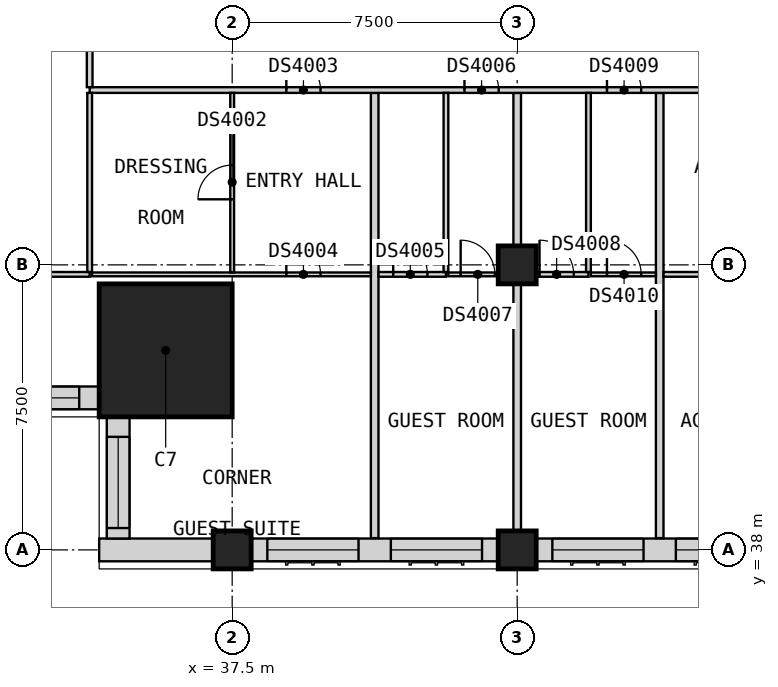
"""IFC4 building model, lengths in metres.
Left out: names, types, materials, properties, quantities, classifications, styles, units other than length and angle.
Written with IfcOpenShell. Run it as: python <this file> out.ifc"""

import sys

from ifc_helpers import new_model, si_unit, direction, frame, frame_2d, origin, origin_2d, place, context, subcontext, project, spatial, rectangle, extrude, element, fill, save


model = new_model("IFC4")
c1 = context("Model", 3, precision=1e-05, world=origin(), true_north=direction((0.0, 1.0)))
c2 = subcontext(c1, "Body", "Model", "MODEL_VIEW")
j1 = project(units=[si_unit("LENGTHUNIT", "METRE"), si_unit("PLANEANGLEUNIT", "RADIAN")], contexts=[c1])
p1 = place(None, origin())
s1 = spatial("IfcSite", under=j1, at=p1, CompositionType="ELEMENT")
p2 = place(p1, origin())
s2 = spatial("IfcBuilding", under=s1, at=p2, CompositionType="ELEMENT")
p3 = place(p2, frame((0.0, 0.0, 141.0)))
s3 = spatial("IfcBuildingStorey", under=s2, at=p3, CompositionType="ELEMENT", Elevation=141.0)
for number, where, z_axis, x_axis in (
    (1, (37.5, 38.0, 0.0), (0.0, 0.0, 1.0), (1.0, 0.0, 0.0)),
    (2, (45.0, 38.0, 0.0), (0.0, 0.0, 1.0), (1.0, 0.0, 0.0)),
    (3, (45.0, 45.5, 0.0), (0.0, 0.0, 1.0), (1.0, 0.0, 0.0)),
):
    element("IfcColumn", number, at=place(p3, frame(where, z_axis=z_axis, x_axis=x_axis)), inside=s3, PredefinedType="COLUMN", context=c2, shape_type="SweptSolid", body=[
        extrude(rectangle(XDim=1.0, YDim=1.0, at=origin_2d()), origin(), (0.0, 0.0, 1.0), 3.6),
    ])
p4 = place(p3, frame((35.75, 43.25, 0.0), z_axis=(0.0, 0.0, 1.0), x_axis=(1.0, 0.0, 0.0)))
e4 = element("IfcColumn", 4, at=p4, inside=s3, PredefinedType="COLUMN", context=c2, shape_type="SweptSolid", body=[
    extrude(rectangle(XDim=3.5, YDim=3.5, at=origin_2d()), origin(), (0.0, 0.0, 1.0), 3.6),
])
p5 = place(p3, frame((34.0, 38.0, 0.0), z_axis=(0.0, 0.0, 1.0), x_axis=(1.0, 0.0, 0.0)))
e5 = element("IfcWall", 5, at=p5, inside=s3, PredefinedType="SOLIDWALL", context=c2, shape_type="SweptSolid", body=[
    extrude(rectangle(XDim=3.0, YDim=0.6, at=frame_2d((1.5, 0.0))), origin(), (0.0, 0.0, 1.0), 3.35),
])
p6 = place(p3, frame((38.0, 38.0, 0.0), z_axis=(0.0, 0.0, 1.0), x_axis=(1.0, 0.0, 0.0)))
e6 = element("IfcWall", 6, at=p6, inside=s3, PredefinedType="SOLIDWALL", context=c2, shape_type="SweptSolid", body=[
    extrude(rectangle(XDim=6.5, YDim=0.6, at=frame_2d((3.25, 0.0))), origin(), (0.0, 0.0, 1.0), 2.85),
])
p7 = place(p6, frame((0.425, 0.0, 0.8)))
e7 = element("IfcOpeningElement", 7, at=p7, cuts=e6, PredefinedType="OPENING", context=c2, shape_type="SweptSolid", body=[
    extrude(rectangle(XDim=2.4, YDim=1.8, at=frame_2d((1.2, 0.9))), frame((0.0, 0.31, 0.0), z_axis=(0.0, -1.0, 0.0), x_axis=(1.0, 0.0, 0.0)), (0.0, 0.0, 1.0), 0.62),
])
p8 = place(p6, frame((3.675, 0.0, 0.8)))
e8 = element("IfcOpeningElement", 8, at=p8, cuts=e6, PredefinedType="OPENING", context=c2, shape_type="SweptSolid", body=[
    extrude(rectangle(XDim=2.4, YDim=1.8, at=frame_2d((1.2, 0.9))), frame((0.0, 0.31, 0.0), z_axis=(0.0, -1.0, 0.0), x_axis=(1.0, 0.0, 0.0)), (0.0, 0.0, 1.0), 0.62),
])
p9 = place(p3, frame((45.5, 38.0, 0.0), z_axis=(0.0, 0.0, 1.0), x_axis=(1.0, 0.0, 0.0)))
e9 = element("IfcWall", 9, at=p9, inside=s3, PredefinedType="SOLIDWALL", context=c2, shape_type="SweptSolid", body=[
    extrude(rectangle(XDim=6.5, YDim=0.6, at=frame_2d((3.25, 0.0))), origin(), (0.0, 0.0, 1.0), 2.85),
])
p10 = place(p9, frame((0.425, 0.0, 0.8)))
e10 = element("IfcOpeningElement", 10, at=p10, cuts=e9, PredefinedType="OPENING", context=c2, shape_type="SweptSolid", body=[
    extrude(rectangle(XDim=2.4, YDim=1.8, at=frame_2d((1.2, 0.9))), frame((0.0, 0.31, 0.0), z_axis=(0.0, -1.0, 0.0), x_axis=(1.0, 0.0, 0.0)), (0.0, 0.0, 1.0), 0.62),
])
p11 = place(p9, frame((3.675, 0.0, 0.8)))
e11 = element("IfcOpeningElement", 11, at=p11, cuts=e9, PredefinedType="OPENING", context=c2, shape_type="SweptSolid", body=[
    extrude(rectangle(XDim=2.4, YDim=1.8, at=frame_2d((1.2, 0.9))), frame((0.0, 0.31, 0.0), z_axis=(0.0, -1.0, 0.0), x_axis=(1.0, 0.0, 0.0)), (0.0, 0.0, 1.0), 0.62),
])
p12 = place(p3, frame((30.8, 42.0, 0.0), z_axis=(0.0, 0.0, 1.0), x_axis=(1.0, 0.0, 0.0)))
e12 = element("IfcWall", 12, at=p12, inside=s3, PredefinedType="SOLIDWALL", context=c2, shape_type="SweptSolid", body=[
    extrude(rectangle(XDim=3.2, YDim=0.6, at=frame_2d((1.6, 0.0))), origin(), (0.0, 0.0, 1.0), 3.35),
])
p13 = place(p12, frame((0.275, 0.0, 0.8)))
e13 = element("IfcOpeningElement", 13, at=p13, cuts=e12, PredefinedType="OPENING", context=c2, shape_type="SweptSolid", body=[
    extrude(rectangle(XDim=2.4, YDim=1.8, at=frame_2d((1.2, 0.9))), frame((0.0, 0.31, 0.0), z_axis=(0.0, -1.0, 0.0), x_axis=(1.0, 0.0, 0.0)), (0.0, 0.0, 1.0), 0.62),
])
p14 = place(p3, frame((34.5, 41.5, 0.0), z_axis=(0.0, 0.0, 1.0), x_axis=(0.0, -1.0, 0.0)))
e14 = element("IfcWall", 14, at=p14, inside=s3, PredefinedType="SOLIDWALL", context=c2, shape_type="SweptSolid", body=[
    extrude(rectangle(XDim=3.2, YDim=0.6, at=frame_2d((1.6, 0.0))), origin(), (0.0, 0.0, 1.0), 3.35),
])
p15 = place(p14, frame((0.525, 0.0, 0.8)))
e15 = element("IfcOpeningElement", 15, at=p15, cuts=e14, PredefinedType="OPENING", context=c2, shape_type="SweptSolid", body=[
    extrude(rectangle(XDim=2.4, YDim=1.8, at=frame_2d((1.2, 0.9))), frame((0.0, 0.31, 0.0), z_axis=(0.0, -1.0, 0.0), x_axis=(1.0, 0.0, 0.0)), (0.0, 0.0, 1.0), 0.62),
])
p16 = place(p3, frame((41.25, 38.31, 0.0), z_axis=(0.0, 0.0, 1.0), x_axis=(0.0, 1.0, 0.0)))
e16 = element("IfcWall", 16, at=p16, inside=s3, PredefinedType="PARTITIONING", context=c2, shape_type="SweptSolid", body=[
    extrude(rectangle(XDim=11.715, YDim=0.2, at=frame_2d((5.857, 0.0))), origin(), (0.0, 0.0, 1.0), 3.35),
])
p17 = place(p3, frame((45.0, 37.5, 0.0), z_axis=(0.0, 0.0, 1.0), x_axis=(0.0, 1.0, 0.0)))
e17 = element("IfcWall", 17, at=p17, inside=s3, PredefinedType="PARTITIONING", context=c2, shape_type="SweptSolid", body=[
    extrude(rectangle(XDim=12.525, YDim=0.2, at=frame_2d((6.262, 0.0))), origin(), (0.0, 0.0, 1.0), 3.35),
])
p18 = place(p3, frame((48.75, 38.31, 0.0), z_axis=(0.0, 0.0, 1.0), x_axis=(0.0, 1.0, 0.0)))
e18 = element("IfcWall", 18, at=p18, inside=s3, PredefinedType="PARTITIONING", context=c2, shape_type="SweptSolid", body=[
    extrude(rectangle(XDim=11.715, YDim=0.2, at=frame_2d((5.857, 0.0))), origin(), (0.0, 0.0, 1.0), 3.35),
])
p19 = place(p3, frame((33.75, 50.1, 0.0), z_axis=(0.0, 0.0, 1.0), x_axis=(1.0, 0.0, 0.0)))
e19 = element("IfcWall", 19, at=p19, inside=s3, PredefinedType="PARTITIONING", context=c2, shape_type="SweptSolid", body=[
    extrude(rectangle(XDim=39.9, YDim=0.15, at=frame_2d((19.95, 0.0))), origin(), (0.0, 0.0, 1.0), 3.35),
])
p20 = place(p19, frame((5.175, 0.0, 0.0)))
e20 = element("IfcOpeningElement", 20, at=p20, cuts=e19, PredefinedType="OPENING", context=c2, shape_type="SweptSolid", body=[
    extrude(rectangle(XDim=0.9, YDim=2.1, at=frame_2d((0.45, 1.05))), frame((0.0, 0.085, 0.0), z_axis=(0.0, -1.0, 0.0), x_axis=(1.0, 0.0, 0.0)), (0.0, 0.0, 1.0), 0.17),
])
p21 = place(p19, frame((9.863, 0.0, 0.0)))
e21 = element("IfcOpeningElement", 21, at=p21, cuts=e19, PredefinedType="OPENING", context=c2, shape_type="SweptSolid", body=[
    extrude(rectangle(XDim=0.9, YDim=2.1, at=frame_2d((0.45, 1.05))), frame((0.0, 0.085, 0.0), z_axis=(0.0, -1.0, 0.0), x_axis=(1.0, 0.0, 0.0)), (0.0, 0.0, 1.0), 0.17),
])
p22 = place(p19, frame((13.613, 0.0, 0.0)))
e22 = element("IfcOpeningElement", 22, at=p22, cuts=e19, PredefinedType="OPENING", context=c2, shape_type="SweptSolid", body=[
    extrude(rectangle(XDim=0.9, YDim=2.1, at=frame_2d((0.45, 1.05))), frame((0.0, 0.085, 0.0), z_axis=(0.0, -1.0, 0.0), x_axis=(1.0, 0.0, 0.0)), (0.0, 0.0, 1.0), 0.17),
])
p23 = place(p19, frame((20.688, 0.0, 0.0)))
e23 = element("IfcOpeningElement", 23, at=p23, cuts=e19, PredefinedType="OPENING", context=c2, shape_type="SweptSolid", body=[
    extrude(rectangle(XDim=1.0, YDim=2.1, at=frame_2d((0.5, 1.05))), frame((0.0, 0.085, 0.0), z_axis=(0.0, -1.0, 0.0), x_axis=(1.0, 0.0, 0.0)), (0.0, 0.0, 1.0), 0.17),
])
p24 = place(p19, frame((28.188, 0.0, 0.0)))
e24 = element("IfcOpeningElement", 24, at=p24, cuts=e19, PredefinedType="OPENING", context=c2, shape_type="SweptSolid", body=[
    extrude(rectangle(XDim=1.0, YDim=2.1, at=frame_2d((0.5, 1.05))), frame((0.0, 0.085, 0.0), z_axis=(0.0, -1.0, 0.0), x_axis=(1.0, 0.0, 0.0)), (0.0, 0.0, 1.0), 0.17),
])
p25 = place(p19, frame((32.363, 0.0, 0.0)))
e25 = element("IfcOpeningElement", 25, at=p25, cuts=e19, PredefinedType="OPENING", context=c2, shape_type="SweptSolid", body=[
    extrude(rectangle(XDim=0.9, YDim=2.1, at=frame_2d((0.45, 1.05))), frame((0.0, 0.085, 0.0), z_axis=(0.0, -1.0, 0.0), x_axis=(1.0, 0.0, 0.0)), (0.0, 0.0, 1.0), 0.17),
])
p26 = place(p19, frame((36.113, 0.0, 0.0)))
e26 = element("IfcOpeningElement", 26, at=p26, cuts=e19, PredefinedType="OPENING", context=c2, shape_type="SweptSolid", body=[
    extrude(rectangle(XDim=0.9, YDim=2.1, at=frame_2d((0.45, 1.05))), frame((0.0, 0.085, 0.0), z_axis=(0.0, -1.0, 0.0), x_axis=(1.0, 0.0, 0.0)), (0.0, 0.0, 1.0), 0.17),
])
p27 = place(p19, frame((38.25, 0.0, 0.0)))
e27 = element("IfcOpeningElement", 27, at=p27, cuts=e19, PredefinedType="OPENING", context=c2, shape_type="SweptSolid", body=[
    extrude(rectangle(XDim=0.9, YDim=2.1, at=frame_2d((0.45, 1.05))), frame((0.0, 0.085, 0.0), z_axis=(0.0, -1.0, 0.0), x_axis=(1.0, 0.0, 0.0)), (0.0, 0.0, 1.0), 0.17),
])
p28 = place(p3, frame((33.75, 50.175, 0.0), z_axis=(0.0, 0.0, 1.0), x_axis=(0.0, 1.0, 0.0)))
e28 = element("IfcWall", 28, at=p28, inside=s3, PredefinedType="PARTITIONING", context=c2, shape_type="SweptSolid", body=[
    extrude(rectangle(XDim=2.225, YDim=0.15, at=frame_2d((1.112, 0.0))), origin(), (0.0, 0.0, 1.0), 3.35),
])
p29 = place(p3, frame((33.812, 45.25, 0.0), z_axis=(0.0, 0.0, 1.0), x_axis=(1.0, 0.0, 0.0)))
e29 = element("IfcWall", 29, at=p29, inside=s3, PredefinedType="PARTITIONING", context=c2, shape_type="SweptSolid", body=[
    extrude(rectangle(XDim=7.337, YDim=0.1, at=frame_2d((3.669, 0.0))), origin(), (0.0, 0.0, 1.0), 3.35),
])
p30 = place(p29, frame((5.113, 0.0, 0.0)))
e30 = element("IfcOpeningElement", 30, at=p30, cuts=e29, PredefinedType="OPENING", context=c2, shape_type="SweptSolid", body=[
    extrude(rectangle(XDim=0.9, YDim=2.1, at=frame_2d((0.45, 1.05))), frame((0.0, 0.06, 0.0), z_axis=(0.0, -1.0, 0.0), x_axis=(1.0, 0.0, 0.0)), (0.0, 0.0, 1.0), 0.12),
])
p31 = place(p3, frame((43.188, 45.25, 0.0), z_axis=(0.0, 0.0, 1.0), x_axis=(1.0, 0.0, 0.0)))
e31 = element("IfcWall", 31, at=p31, inside=s3, PredefinedType="PARTITIONING", context=c2, shape_type="SweptSolid", body=[
    extrude(rectangle(XDim=1.712, YDim=0.1, at=frame_2d((0.856, 0.0))), origin(), (0.0, 0.0, 1.0), 3.35),
])
p32 = place(p31, frame((0.325, 0.0, 0.0)))
e32 = element("IfcOpeningElement", 32, at=p32, cuts=e31, PredefinedType="OPENING", context=c2, shape_type="SweptSolid", body=[
    extrude(rectangle(XDim=0.9, YDim=2.1, at=frame_2d((0.45, 1.05))), frame((0.0, 0.06, 0.0), z_axis=(0.0, -1.0, 0.0), x_axis=(1.0, 0.0, 0.0)), (0.0, 0.0, 1.0), 0.12),
])
p33 = place(p3, frame((46.938, 45.25, 0.0), z_axis=(0.0, 0.0, 1.0), x_axis=(1.0, 0.0, 0.0)))
e33 = element("IfcWall", 33, at=p33, inside=s3, PredefinedType="PARTITIONING", context=c2, shape_type="SweptSolid", body=[
    extrude(rectangle(XDim=1.712, YDim=0.1, at=frame_2d((0.856, 0.0))), origin(), (0.0, 0.0, 1.0), 3.35),
])
p34 = place(p33, frame((0.425, 0.0, 0.0)))
e34 = element("IfcOpeningElement", 34, at=p34, cuts=e33, PredefinedType="OPENING", context=c2, shape_type="SweptSolid", body=[
    extrude(rectangle(XDim=0.9, YDim=2.1, at=frame_2d((0.45, 1.05))), frame((0.0, 0.06, 0.0), z_axis=(0.0, -1.0, 0.0), x_axis=(1.0, 0.0, 0.0)), (0.0, 0.0, 1.0), 0.12),
])
p35 = place(p3, frame((37.5, 45.3, 0.0), z_axis=(0.0, 0.0, 1.0), x_axis=(0.0, 1.0, 0.0)))
e35 = element("IfcWall", 35, at=p35, inside=s3, PredefinedType="PARTITIONING", context=c2, shape_type="SweptSolid", body=[
    extrude(rectangle(XDim=4.725, YDim=0.1, at=frame_2d((2.362, 0.0))), origin(), (0.0, 0.0, 1.0), 3.35),
])
p36 = place(p35, frame((1.925, 0.0, 0.0)))
e36 = element("IfcOpeningElement", 36, at=p36, cuts=e35, PredefinedType="OPENING", context=c2, shape_type="SweptSolid", body=[
    extrude(rectangle(XDim=0.9, YDim=2.1, at=frame_2d((0.45, 1.05))), frame((0.0, 0.06, 0.0), z_axis=(0.0, -1.0, 0.0), x_axis=(1.0, 0.0, 0.0)), (0.0, 0.0, 1.0), 0.12),
])
p37 = place(p3, frame((30.0, 45.25, 0.0), z_axis=(0.0, 0.0, 1.0), x_axis=(1.0, 0.0, 0.0)))
e37 = element("IfcWall", 37, at=p37, inside=s3, PredefinedType="PARTITIONING", context=c2, shape_type="SweptSolid", body=[
    extrude(rectangle(XDim=3.75, YDim=0.125, at=frame_2d((1.875, 0.0))), origin(), (0.0, 0.0, 1.0), 3.35),
])
p38 = place(p37, frame((1.425, 0.0, 0.0)))
e38 = element("IfcOpeningElement", 38, at=p38, cuts=e37, PredefinedType="OPENING", context=c2, shape_type="SweptSolid", body=[
    extrude(rectangle(XDim=0.9, YDim=2.1, at=frame_2d((0.45, 1.05))), frame((0.0, 0.073, 0.0), z_axis=(0.0, -1.0, 0.0), x_axis=(1.0, 0.0, 0.0)), (0.0, 0.0, 1.0), 0.145),
])
p39 = place(p3, frame((41.35, 45.25, 0.0), z_axis=(0.0, 0.0, 1.0), x_axis=(1.0, 0.0, 0.0)))
e39 = element("IfcWall", 39, at=p39, inside=s3, PredefinedType="PARTITIONING", context=c2, shape_type="SweptSolid", body=[
    extrude(rectangle(XDim=1.775, YDim=0.125, at=frame_2d((0.887, 0.0))), origin(), (0.0, 0.0, 1.0), 3.35),
])
p40 = place(p39, frame((0.387, 0.0, 0.0)))
e40 = element("IfcOpeningElement", 40, at=p40, cuts=e39, PredefinedType="OPENING", context=c2, shape_type="SweptSolid", body=[
    extrude(rectangle(XDim=0.9, YDim=2.1, at=frame_2d((0.45, 1.05))), frame((0.0, 0.073, 0.0), z_axis=(0.0, -1.0, 0.0), x_axis=(1.0, 0.0, 0.0)), (0.0, 0.0, 1.0), 0.145),
])
p41 = place(p3, frame((45.1, 45.25, 0.0), z_axis=(0.0, 0.0, 1.0), x_axis=(1.0, 0.0, 0.0)))
e41 = element("IfcWall", 41, at=p41, inside=s3, PredefinedType="PARTITIONING", context=c2, shape_type="SweptSolid", body=[
    extrude(rectangle(XDim=1.775, YDim=0.125, at=frame_2d((0.887, 0.0))), origin(), (0.0, 0.0, 1.0), 3.35),
])
p42 = place(p41, frame((0.488, 0.0, 0.0)))
e42 = element("IfcOpeningElement", 42, at=p42, cuts=e41, PredefinedType="OPENING", context=c2, shape_type="SweptSolid", body=[
    extrude(rectangle(XDim=0.9, YDim=2.1, at=frame_2d((0.45, 1.05))), frame((0.0, 0.073, 0.0), z_axis=(0.0, -1.0, 0.0), x_axis=(1.0, 0.0, 0.0)), (0.0, 0.0, 1.0), 0.145),
])
p43 = place(p3, frame((48.85, 45.25, 0.0), z_axis=(0.0, 0.0, 1.0), x_axis=(1.0, 0.0, 0.0)))
e43 = element("IfcWall", 43, at=p43, inside=s3, PredefinedType="PARTITIONING", context=c2, shape_type="SweptSolid", body=[
    extrude(rectangle(XDim=4.775, YDim=0.125, at=frame_2d((2.387, 0.0))), origin(), (0.0, 0.0, 1.0), 3.35),
])
p44 = place(p43, frame((1.837, 0.0, 0.0)))
e44 = element("IfcOpeningElement", 44, at=p44, cuts=e43, PredefinedType="OPENING", context=c2, shape_type="SweptSolid", body=[
    extrude(rectangle(XDim=1.0, YDim=2.1, at=frame_2d((0.5, 1.05))), frame((0.0, 0.073, 0.0), z_axis=(0.0, -1.0, 0.0), x_axis=(1.0, 0.0, 0.0)), (0.0, 0.0, 1.0), 0.145),
])
for number, where, z_axis, x_axis in (
    (45, (33.75, 45.312, 0.0), (0.0, 0.0, 1.0), (0.0, 1.0, 0.0)),
    (46, (43.125, 45.312, 0.0), (0.0, 0.0, 1.0), (0.0, 1.0, 0.0)),
    (47, (46.875, 45.312, 0.0), (0.0, 0.0, 1.0), (0.0, 1.0, 0.0)),
):
    element("IfcWall", number, at=place(p3, frame(where, z_axis=z_axis, x_axis=x_axis)), inside=s3, PredefinedType="PARTITIONING", context=c2, shape_type="SweptSolid", body=[
        extrude(rectangle(XDim=4.712, YDim=0.125, at=frame_2d((2.356, 0.0))), origin(), (0.0, 0.0, 1.0), 3.35),
    ])
p45 = place(p7, origin())
e48 = element("IfcWindow", 48, at=p45, inside=s3, PartitioningType="SINGLE_PANEL", PredefinedType="WINDOW", context=c2, shape_type="SweptSolid", body=[
    extrude(rectangle(XDim=2.4, YDim=1.8, at=frame_2d((1.2, 0.9))), frame((0.0, -0.07, 0.0), z_axis=(0.0, -1.0, 0.0), x_axis=(1.0, 0.0, 0.0)), (0.0, 0.0, 1.0), 0.06),
])
fill(e7, e48)
p46 = place(p8, origin())
e49 = element("IfcWindow", 49, at=p46, inside=s3, PartitioningType="SINGLE_PANEL", PredefinedType="WINDOW", context=c2, shape_type="SweptSolid", body=[
    extrude(rectangle(XDim=2.4, YDim=1.8, at=frame_2d((1.2, 0.9))), frame((0.0, -0.07, 0.0), z_axis=(0.0, -1.0, 0.0), x_axis=(1.0, 0.0, 0.0)), (0.0, 0.0, 1.0), 0.06),
])
fill(e8, e49)
p47 = place(p10, origin())
e50 = element("IfcWindow", 50, at=p47, inside=s3, PartitioningType="SINGLE_PANEL", PredefinedType="WINDOW", context=c2, shape_type="SweptSolid", body=[
    extrude(rectangle(XDim=2.4, YDim=1.8, at=frame_2d((1.2, 0.9))), frame((0.0, -0.07, 0.0), z_axis=(0.0, -1.0, 0.0), x_axis=(1.0, 0.0, 0.0)), (0.0, 0.0, 1.0), 0.06),
])
fill(e10, e50)
p48 = place(p11, origin())
e51 = element("IfcWindow", 51, at=p48, inside=s3, PartitioningType="SINGLE_PANEL", PredefinedType="WINDOW", context=c2, shape_type="SweptSolid", body=[
    extrude(rectangle(XDim=2.4, YDim=1.8, at=frame_2d((1.2, 0.9))), frame((0.0, -0.07, 0.0), z_axis=(0.0, -1.0, 0.0), x_axis=(1.0, 0.0, 0.0)), (0.0, 0.0, 1.0), 0.06),
])
fill(e11, e51)
p49 = place(p13, origin())
e52 = element("IfcWindow", 52, at=p49, inside=s3, PartitioningType="SINGLE_PANEL", PredefinedType="WINDOW", context=c2, shape_type="SweptSolid", body=[
    extrude(rectangle(XDim=2.4, YDim=1.8, at=frame_2d((1.2, 0.9))), frame((0.0, -0.07, 0.0), z_axis=(0.0, -1.0, 0.0), x_axis=(1.0, 0.0, 0.0)), (0.0, 0.0, 1.0), 0.06),
])
fill(e13, e52)
p50 = place(p15, origin())
e53 = element("IfcWindow", 53, at=p50, inside=s3, PartitioningType="SINGLE_PANEL", PredefinedType="WINDOW", context=c2, shape_type="SweptSolid", body=[
    extrude(rectangle(XDim=2.4, YDim=1.8, at=frame_2d((1.2, 0.9))), frame((0.0, -0.07, 0.0), z_axis=(0.0, -1.0, 0.0), x_axis=(1.0, 0.0, 0.0)), (0.0, 0.0, 1.0), 0.06),
])
fill(e15, e53)
p51 = place(p36, origin())
e54 = element("IfcDoor", 54, at=p51, inside=s3, OperationType="SINGLE_SWING_RIGHT", PredefinedType="DOOR", context=c2, shape_type="SweptSolid", body=[
    extrude(rectangle(XDim=0.9, YDim=2.1, at=frame_2d((0.45, 1.05))), frame((0.0, 0.025, 0.0), z_axis=(0.0, -1.0, 0.0), x_axis=(1.0, 0.0, 0.0)), (0.0, 0.0, 1.0), 0.05),
])
fill(e36, e54)
p52 = place(p20, origin())
e55 = element("IfcDoor", 55, at=p52, inside=s3, OperationType="SINGLE_SWING_RIGHT", PredefinedType="DOOR", context=c2, shape_type="SweptSolid", body=[
    extrude(rectangle(XDim=0.9, YDim=2.1, at=frame_2d((0.45, 1.05))), frame((0.0, 0.025, 0.0), z_axis=(0.0, -1.0, 0.0), x_axis=(1.0, 0.0, 0.0)), (0.0, 0.0, 1.0), 0.05),
])
fill(e20, e55)
p53 = place(p30, origin())
e56 = element("IfcDoor", 56, at=p53, inside=s3, OperationType="SINGLE_SWING_LEFT", PredefinedType="DOOR", context=c2, shape_type="SweptSolid", body=[
    extrude(rectangle(XDim=0.9, YDim=2.1, at=frame_2d((0.45, 1.05))), frame((0.0, 0.025, 0.0), z_axis=(0.0, -1.0, 0.0), x_axis=(1.0, 0.0, 0.0)), (0.0, 0.0, 1.0), 0.05),
])
fill(e30, e56)
p54 = place(p40, origin())
e57 = element("IfcDoor", 57, at=p54, inside=s3, OperationType="SINGLE_SWING_LEFT", PredefinedType="DOOR", context=c2, shape_type="SweptSolid", body=[
    extrude(rectangle(XDim=0.9, YDim=2.1, at=frame_2d((0.45, 1.05))), frame((0.0, 0.025, 0.0), z_axis=(0.0, -1.0, 0.0), x_axis=(1.0, 0.0, 0.0)), (0.0, 0.0, 1.0), 0.05),
])
fill(e40, e57)
p55 = place(p21, origin())
e58 = element("IfcDoor", 58, at=p55, inside=s3, OperationType="SINGLE_SWING_RIGHT", PredefinedType="DOOR", context=c2, shape_type="SweptSolid", body=[
    extrude(rectangle(XDim=0.9, YDim=2.1, at=frame_2d((0.45, 1.05))), frame((0.0, 0.025, 0.0), z_axis=(0.0, -1.0, 0.0), x_axis=(1.0, 0.0, 0.0)), (0.0, 0.0, 1.0), 0.05),
])
fill(e21, e58)
p56 = place(p32, origin())
e59 = element("IfcDoor", 59, at=p56, inside=s3, OperationType="SINGLE_SWING_LEFT", PredefinedType="DOOR", context=c2, shape_type="SweptSolid", body=[
    extrude(rectangle(XDim=0.9, YDim=2.1, at=frame_2d((0.45, 1.05))), frame((0.0, 0.025, 0.0), z_axis=(0.0, -1.0, 0.0), x_axis=(1.0, 0.0, 0.0)), (0.0, 0.0, 1.0), 0.05),
])
fill(e32, e59)
p57 = place(p42, origin())
e60 = element("IfcDoor", 60, at=p57, inside=s3, OperationType="SINGLE_SWING_RIGHT", PredefinedType="DOOR", context=c2, shape_type="SweptSolid", body=[
    extrude(rectangle(XDim=0.9, YDim=2.1, at=frame_2d((0.45, 1.05))), frame((0.0, 0.025, 0.0), z_axis=(0.0, -1.0, 0.0), x_axis=(1.0, 0.0, 0.0)), (0.0, 0.0, 1.0), 0.05),
])
fill(e42, e60)
p58 = place(p22, origin())
e61 = element("IfcDoor", 61, at=p58, inside=s3, OperationType="SINGLE_SWING_RIGHT", PredefinedType="DOOR", context=c2, shape_type="SweptSolid", body=[
    extrude(rectangle(XDim=0.9, YDim=2.1, at=frame_2d((0.45, 1.05))), frame((0.0, 0.025, 0.0), z_axis=(0.0, -1.0, 0.0), x_axis=(1.0, 0.0, 0.0)), (0.0, 0.0, 1.0), 0.05),
])
fill(e22, e61)
p59 = place(p34, origin())
e62 = element("IfcDoor", 62, at=p59, inside=s3, OperationType="SINGLE_SWING_LEFT", PredefinedType="DOOR", context=c2, shape_type="SweptSolid", body=[
    extrude(rectangle(XDim=0.9, YDim=2.1, at=frame_2d((0.45, 1.05))), frame((0.0, 0.025, 0.0), z_axis=(0.0, -1.0, 0.0), x_axis=(1.0, 0.0, 0.0)), (0.0, 0.0, 1.0), 0.05),
])
fill(e34, e62)
save(model, sys.argv[1])
